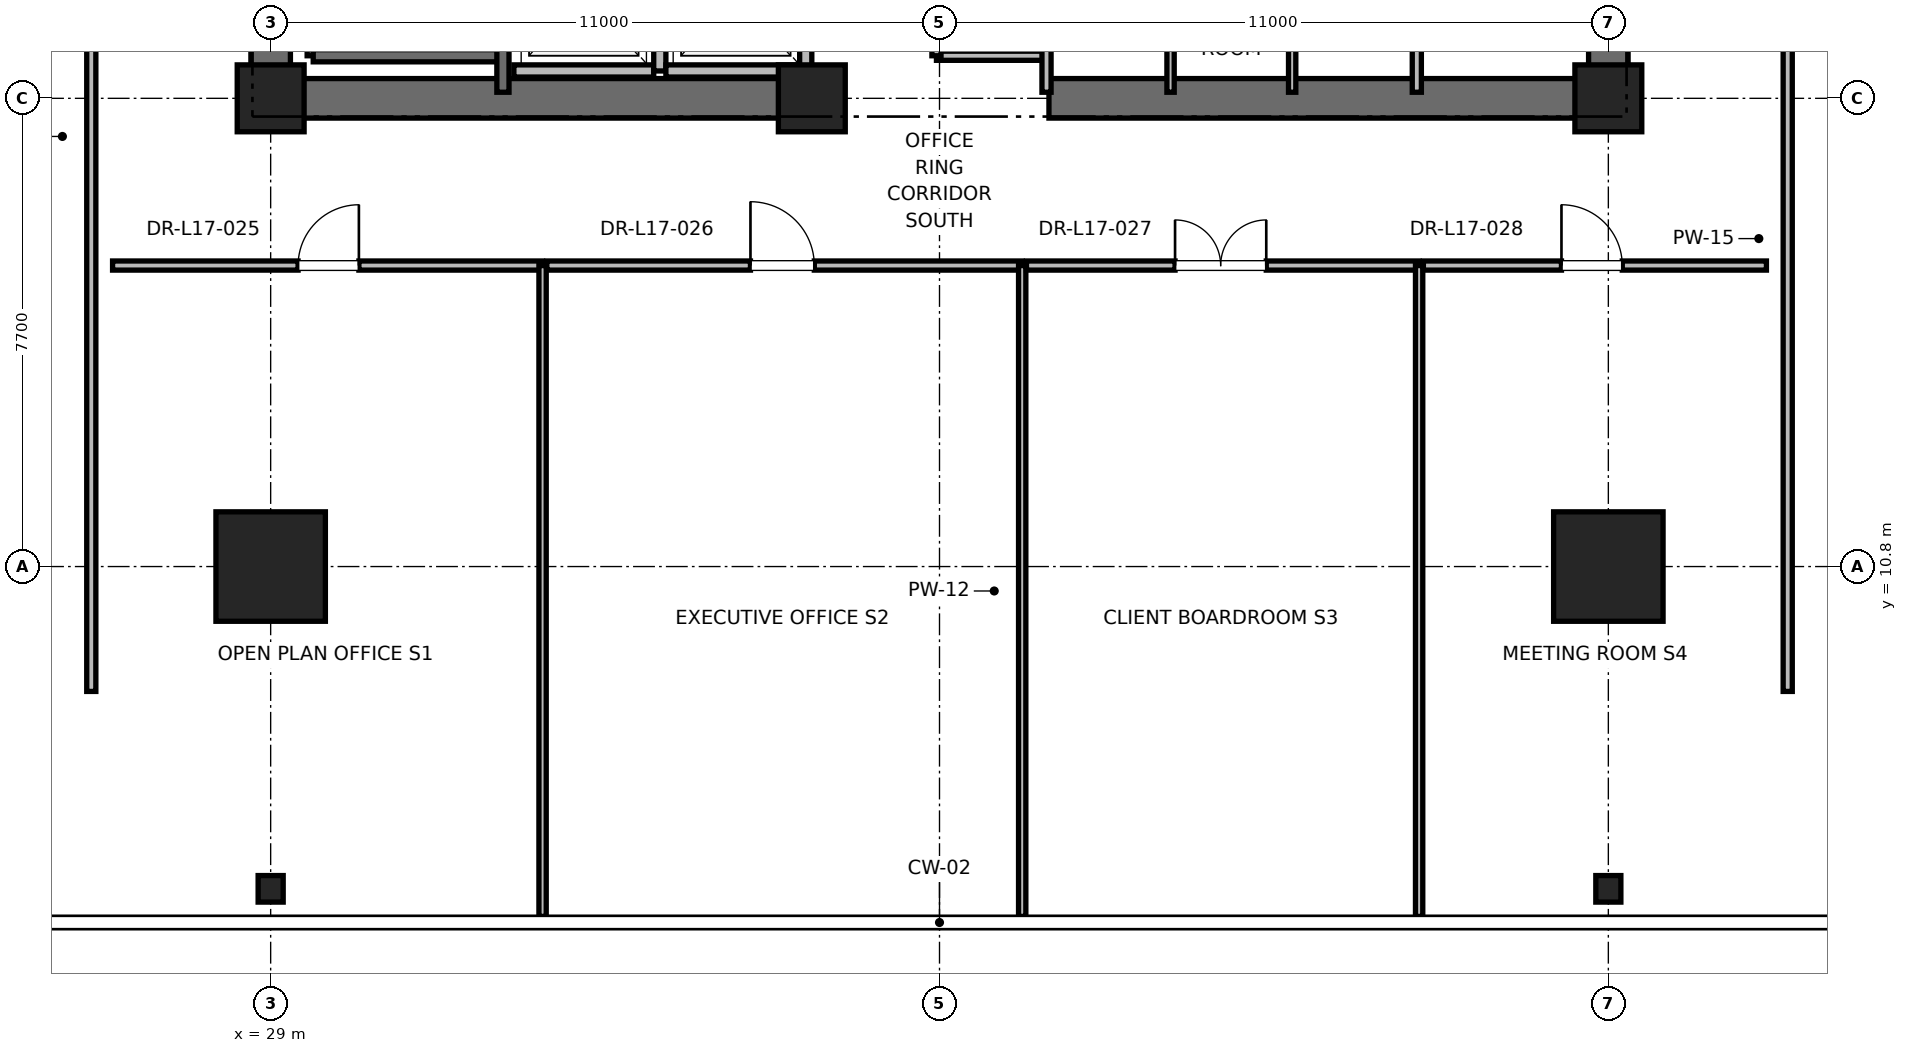
"""IFC4 building model, lengths in metres.
Left out: names, types, materials, properties, quantities, classifications, styles, units other than length and angle.
Written with IfcOpenShell. Run it as: python <this file> out.ifc"""

import sys

from ifc_helpers import new_model, si_unit, direction, frame, frame_2d, origin, origin_2d, place, context, subcontext, project, spatial, rectangle, i_section, extrude, element, fill, save


model = new_model("IFC4")
c1 = context("Model", 3, precision=1e-05, world=origin(), true_north=direction((0.0, 1.0)))
c2 = subcontext(c1, "Body", "Model", "MODEL_VIEW")
j1 = project(units=[si_unit("LENGTHUNIT", "METRE"), si_unit("PLANEANGLEUNIT", "RADIAN")], contexts=[c1])
p1 = place(None, origin())
s1 = spatial("IfcSite", under=j1, at=p1, CompositionType="ELEMENT")
p2 = place(p1, origin())
s2 = spatial("IfcBuilding", under=s1, at=p2, CompositionType="ELEMENT")
p3 = place(p2, frame((0.0, 0.0, 75.6)))
s3 = spatial("IfcBuildingStorey", under=s2, at=p3, CompositionType="ELEMENT", Elevation=75.6)
for number, where, z_axis, x_axis in (
    (1, (29.0, 10.8, 0.0), (0.0, 0.0, 1.0), (1.0, 0.0, 0.0)),
    (2, (51.0, 10.8, 0.0), (0.0, 0.0, 1.0), (1.0, 0.0, 0.0)),
):
    element("IfcColumn", number, at=place(p3, frame(where, z_axis=z_axis, x_axis=x_axis)), inside=s3, PredefinedType="COLUMN", context=c2, shape_type="SweptSolid", body=[
        extrude(rectangle(XDim=1.8, YDim=1.8, at=origin_2d()), origin(), (0.0, 0.0, 1.0), 4.0),
    ])
for number, where, z_axis, x_axis in (
    (3, (29.0, 5.5, 0.0), (0.0, 0.0, 1.0), (1.0, 0.0, 0.0)),
    (4, (51.0, 5.5, 0.0), (0.0, 0.0, 1.0), (1.0, 0.0, 0.0)),
):
    element("IfcColumn", number, at=place(p3, frame(where, z_axis=z_axis, x_axis=x_axis)), inside=s3, PredefinedType="COLUMN", context=c2, shape_type="SweptSolid", body=[
        extrude(i_section(OverallWidth=0.412, OverallDepth=0.437, WebThickness=0.036, FlangeThickness=0.058, FilletRadius=0.015, at=origin_2d()), origin(), (0.0, 0.0, 1.0), 4.0),
    ])
for number, where, z_axis, x_axis in (
    (5, (29.0, 18.5, 0.0), (0.0, 0.0, 1.0), (1.0, 0.0, 0.0)),
    (6, (51.0, 18.5, 0.0), (0.0, 0.0, 1.0), (1.0, 0.0, 0.0)),
    (7, (37.9, 18.5, 0.0), (0.0, 0.0, 1.0), (1.0, 0.0, 0.0)),
):
    element("IfcColumn", number, at=place(p3, frame(where, z_axis=z_axis, x_axis=x_axis)), inside=s3, PredefinedType="PILASTER", context=c2, shape_type="SweptSolid", body=[
        extrude(rectangle(XDim=1.1, YDim=1.1, at=origin_2d()), origin(), (0.0, 0.0, 1.0), 4.0),
    ])
for number, where, z_axis, x_axis in (
    (8, (29.0, 18.5, 0.0), (0.0, 0.0, 1.0), (1.0, 0.0, 0.0)),
    (9, (41.8, 18.5, 0.0), (0.0, 0.0, 1.0), (1.0, 0.0, 0.0)),
):
    element("IfcWall", number, at=place(p3, frame(where, z_axis=z_axis, x_axis=x_axis)), inside=s3, PredefinedType="SHEAR", context=c2, shape_type="SweptSolid", body=[
        extrude(rectangle(XDim=9.2, YDim=0.65, at=frame_2d((4.6, 0.0))), origin(), (0.0, 0.0, 1.0), 3.76),
    ])
p4 = place(p3, frame((29.0, 18.5, 0.0), z_axis=(0.0, 0.0, 1.0), x_axis=(0.0, 1.0, 0.0)))
e10 = element("IfcWall", 10, at=p4, inside=s3, PredefinedType="SHEAR", context=c2, shape_type="SweptSolid", body=[
    extrude(rectangle(XDim=8.8, YDim=0.65, at=frame_2d((4.4, 0.0))), origin(), (0.0, 0.0, 1.0), 3.76),
])
p5 = place(p3, frame((51.0, 18.5, 0.0), z_axis=(0.0, 0.0, 1.0), x_axis=(0.0, 1.0, 0.0)))
e11 = element("IfcWall", 11, at=p5, inside=s3, PredefinedType="SHEAR", context=c2, shape_type="SweptSolid", body=[
    extrude(rectangle(XDim=5.8, YDim=0.65, at=frame_2d((2.9, 0.0))), origin(), (0.0, 0.0, 1.0), 3.76),
])
p6 = place(p3, frame((29.7, 19.2, 0.0), z_axis=(0.0, 0.0, 1.0), x_axis=(0.0, 1.0, 0.0)))
e12 = element("IfcWall", 12, at=p6, inside=s3, PredefinedType="SOLIDWALL", context=c2, shape_type="SweptSolid", body=[
    extrude(rectangle(XDim=8.15, YDim=0.2, at=frame_2d((4.075, 0.0))), origin(), (0.0, 0.0, 1.0), 3.76),
])
p7 = place(p3, frame((29.7, 19.2, 0.0), z_axis=(0.0, 0.0, 1.0), x_axis=(1.0, 0.0, 0.0)))
e13 = element("IfcWall", 13, at=p7, inside=s3, PredefinedType="SOLIDWALL", context=c2, shape_type="SweptSolid", body=[
    extrude(rectangle(XDim=3.12, YDim=0.2, at=frame_2d((1.56, 0.0))), origin(), (0.0, 0.0, 1.0), 3.76),
])
p8 = place(p3, frame((32.82, 18.6, 0.0), z_axis=(0.0, 0.0, 1.0), x_axis=(0.0, 1.0, 0.0)))
e14 = element("IfcWall", 14, at=p8, inside=s3, PredefinedType="SOLIDWALL", context=c2, shape_type="SweptSolid", body=[
    extrude(rectangle(XDim=8.78, YDim=0.2, at=frame_2d((4.39, 0.0))), origin(), (0.0, 0.0, 1.0), 3.76),
])
p9 = place(p3, frame((33.0, 18.95, 0.0), z_axis=(0.0, 0.0, 1.0), x_axis=(1.0, 0.0, 0.0)))
e15 = element("IfcWall", 15, at=p9, inside=s3, PredefinedType="SOLIDWALL", context=c2, shape_type="SweptSolid", body=[
    extrude(rectangle(XDim=2.3, YDim=0.2, at=frame_2d((1.15, 0.0))), origin(), (0.0, 0.0, 1.0), 3.76),
])
p10 = place(p3, frame((35.4, 18.95, 0.0), z_axis=(0.0, 0.0, 1.0), x_axis=(0.0, 1.0, 0.0)))
e16 = element("IfcWall", 16, at=p10, inside=s3, PredefinedType="SOLIDWALL", context=c2, shape_type="SweptSolid", body=[
    extrude(rectangle(XDim=2.6, YDim=0.2, at=frame_2d((1.3, 0.0))), origin(), (0.0, 0.0, 1.0), 3.76),
])
p11 = place(p3, frame((35.5, 18.95, 0.0), z_axis=(0.0, 0.0, 1.0), x_axis=(1.0, 0.0, 0.0)))
e17 = element("IfcWall", 17, at=p11, inside=s3, PredefinedType="SOLIDWALL", context=c2, shape_type="SweptSolid", body=[
    extrude(rectangle(XDim=2.3, YDim=0.2, at=frame_2d((1.15, 0.0))), origin(), (0.0, 0.0, 1.0), 2.54),
])
p12 = place(p3, frame((37.8, 18.95, 0.0), z_axis=(0.0, 0.0, 1.0), x_axis=(0.0, 1.0, 0.0)))
e18 = element("IfcWall", 18, at=p12, inside=s3, PredefinedType="SOLIDWALL", context=c2, shape_type="SweptSolid", body=[
    extrude(rectangle(XDim=2.6, YDim=0.2, at=frame_2d((1.3, 0.0))), origin(), (0.0, 0.0, 1.0), 2.54),
])
p13 = place(p3, frame((39.95, 19.2, 0.0), z_axis=(0.0, 0.0, 1.0), x_axis=(1.0, 0.0, 0.0)))
e19 = element("IfcWall", 19, at=p13, inside=s3, PredefinedType="PARTITIONING", context=c2, shape_type="SweptSolid", body=[
    extrude(rectangle(XDim=1.81, YDim=0.15, at=frame_2d((0.905, 0.0))), origin(), (0.0, 0.0, 1.0), 2.85),
])
p14 = place(p3, frame((41.76, 18.6, 0.0), z_axis=(0.0, 0.0, 1.0), x_axis=(0.0, 1.0, 0.0)))
e20 = element("IfcWall", 20, at=p14, inside=s3, PredefinedType="PARTITIONING", context=c2, shape_type="SweptSolid", body=[
    extrude(rectangle(XDim=3.6, YDim=0.15, at=frame_2d((1.8, 0.0))), origin(), (0.0, 0.0, 1.0), 2.54),
])
p15 = place(p3, frame((39.95, 19.2, 0.0), z_axis=(0.0, 0.0, 1.0), x_axis=(0.0, 1.0, 0.0)))
e21 = element("IfcWall", 21, at=p15, inside=s3, PredefinedType="PARTITIONING", context=c2, shape_type="SweptSolid", body=[
    extrude(rectangle(XDim=3.0, YDim=0.15, at=frame_2d((1.5, 0.0))), origin(), (0.0, 0.0, 1.0), 2.85),
])
p16 = place(p15, frame((1.05, 0.0, 0.0)))
e22 = element("IfcOpeningElement", 22, at=p16, cuts=e21, PredefinedType="OPENING", context=c2, shape_type="SweptSolid", body=[
    extrude(rectangle(XDim=0.9, YDim=2.1, at=frame_2d((0.45, 1.05))), frame((0.0, 0.075, 0.0), z_axis=(0.0, -1.0, 0.0), x_axis=(1.0, 0.0, 0.0)), (0.0, 0.0, 1.0), 0.15),
])
p17 = place(p3, frame((47.85, 18.6, 0.0), z_axis=(0.0, 0.0, 1.0), x_axis=(0.0, 1.0, 0.0)))
e23 = element("IfcWall", 23, at=p17, inside=s3, PredefinedType="PARTITIONING", context=c2, shape_type="SweptSolid", body=[
    extrude(rectangle(XDim=2.54, YDim=0.15, at=frame_2d((1.27, 0.0))), origin(), (0.0, 0.0, 1.0), 2.85),
])
for number, where, z_axis, x_axis in (
    (24, (43.8, 18.6, 0.0), (0.0, 0.0, 1.0), (0.0, 1.0, 0.0)),
    (25, (45.8, 18.6, 0.0), (0.0, 0.0, 1.0), (0.0, 1.0, 0.0)),
):
    element("IfcWall", number, at=place(p3, frame(where, z_axis=z_axis, x_axis=x_axis)), inside=s3, PredefinedType="PARTITIONING", context=c2, shape_type="SweptSolid", body=[
        extrude(rectangle(XDim=3.02, YDim=0.12, at=frame_2d((1.51, 0.0))), origin(), (0.0, 0.0, 1.0), 2.85),
    ])
p18 = place(p3, frame((26.4, 15.75, 0.0), z_axis=(0.0, 0.0, 1.0), x_axis=(1.0, 0.0, 0.0)))
e26 = element("IfcWall", 26, at=p18, inside=s3, PredefinedType="PARTITIONING", context=c2, shape_type="SweptSolid", body=[
    extrude(rectangle(XDim=7.072, YDim=0.15, at=frame_2d((3.536, 0.0))), origin(), (0.0, 0.0, 1.0), 2.85),
])
p19 = place(p18, frame((3.051, 0.0, 0.0)))
e27 = element("IfcOpeningElement", 27, at=p19, cuts=e26, PredefinedType="OPENING", context=c2, shape_type="SweptSolid", body=[
    extrude(rectangle(XDim=1.0, YDim=2.15, at=frame_2d((0.5, 1.075))), frame((0.0, 0.075, 0.0), z_axis=(0.0, -1.0, 0.0), x_axis=(1.0, 0.0, 0.0)), (0.0, 0.0, 1.0), 0.15),
])
p20 = place(p3, frame((33.472, 5.046, 0.0), z_axis=(0.0, 0.0, 1.0), x_axis=(0.0, 1.0, 0.0)))
e28 = element("IfcWall", 28, at=p20, inside=s3, PredefinedType="PARTITIONING", context=c2, shape_type="SweptSolid", body=[
    extrude(rectangle(XDim=10.704, YDim=0.12, at=frame_2d((5.352, 0.0))), origin(), (0.0, 0.0, 1.0), 2.39),
])
p21 = place(p3, frame((33.542, 15.75, 0.0), z_axis=(0.0, 0.0, 1.0), x_axis=(1.0, 0.0, 0.0)))
e29 = element("IfcWall", 29, at=p21, inside=s3, PredefinedType="PARTITIONING", context=c2, shape_type="SweptSolid", body=[
    extrude(rectangle(XDim=7.818, YDim=0.15, at=frame_2d((3.909, 0.0))), origin(), (0.0, 0.0, 1.0), 2.85),
])
p22 = place(p21, frame((3.349, 0.0, 0.0)))
e30 = element("IfcOpeningElement", 30, at=p22, cuts=e29, PredefinedType="OPENING", context=c2, shape_type="SweptSolid", body=[
    extrude(rectangle(XDim=1.05, YDim=2.2, at=frame_2d((0.525, 1.1))), frame((0.0, 0.075, 0.0), z_axis=(0.0, -1.0, 0.0), x_axis=(1.0, 0.0, 0.0)), (0.0, 0.0, 1.0), 0.15),
])
p23 = place(p3, frame((41.36, 5.046, 0.0), z_axis=(0.0, 0.0, 1.0), x_axis=(0.0, 1.0, 0.0)))
e31 = element("IfcWall", 31, at=p23, inside=s3, PredefinedType="PARTITIONING", context=c2, shape_type="SweptSolid", body=[
    extrude(rectangle(XDim=10.704, YDim=0.12, at=frame_2d((5.352, 0.0))), origin(), (0.0, 0.0, 1.0), 2.39),
])
p24 = place(p3, frame((41.43, 15.75, 0.0), z_axis=(0.0, 0.0, 1.0), x_axis=(1.0, 0.0, 0.0)))
e32 = element("IfcWall", 32, at=p24, inside=s3, PredefinedType="PARTITIONING", context=c2, shape_type="SweptSolid", body=[
    extrude(rectangle(XDim=6.458, YDim=0.15, at=frame_2d((3.229, 0.0))), origin(), (0.0, 0.0, 1.0), 2.85),
])
p25 = place(p24, frame((2.444, 0.0, 0.0)))
e33 = element("IfcOpeningElement", 33, at=p25, cuts=e32, PredefinedType="OPENING", context=c2, shape_type="SweptSolid", body=[
    extrude(rectangle(XDim=1.5, YDim=2.25, at=frame_2d((0.75, 1.125))), frame((0.0, 0.075, 0.0), z_axis=(0.0, -1.0, 0.0), x_axis=(1.0, 0.0, 0.0)), (0.0, 0.0, 1.0), 0.15),
])
p26 = place(p3, frame((47.888, 5.046, 0.0), z_axis=(0.0, 0.0, 1.0), x_axis=(0.0, 1.0, 0.0)))
e34 = element("IfcWall", 34, at=p26, inside=s3, PredefinedType="PARTITIONING", context=c2, shape_type="SweptSolid", body=[
    extrude(rectangle(XDim=10.704, YDim=0.12, at=frame_2d((5.352, 0.0))), origin(), (0.0, 0.0, 1.0), 2.39),
])
p27 = place(p3, frame((47.958, 15.75, 0.0), z_axis=(0.0, 0.0, 1.0), x_axis=(1.0, 0.0, 0.0)))
e35 = element("IfcWall", 35, at=p27, inside=s3, PredefinedType="PARTITIONING", context=c2, shape_type="SweptSolid", body=[
    extrude(rectangle(XDim=5.642, YDim=0.15, at=frame_2d((2.821, 0.0))), origin(), (0.0, 0.0, 1.0), 2.85),
])
p28 = place(p27, frame((2.271, 0.0, 0.0)))
e36 = element("IfcOpeningElement", 36, at=p28, cuts=e35, PredefinedType="OPENING", context=c2, shape_type="SweptSolid", body=[
    extrude(rectangle(XDim=1.0, YDim=2.15, at=frame_2d((0.5, 1.075))), frame((0.0, 0.075, 0.0), z_axis=(0.0, -1.0, 0.0), x_axis=(1.0, 0.0, 0.0)), (0.0, 0.0, 1.0), 0.15),
])
p29 = place(p3, frame((26.05, 8.746, 0.0), z_axis=(0.0, 0.0, 1.0), x_axis=(0.0, 1.0, 0.0)))
e37 = element("IfcWall", 37, at=p29, inside=s3, PredefinedType="PARTITIONING", context=c2, shape_type="SweptSolid", body=[
    extrude(rectangle(XDim=37.507, YDim=0.15, at=frame_2d((18.754, 0.0))), origin(), (0.0, 0.0, 1.0), 2.85),
])
p30 = place(p29, frame((18.254, 0.0, 0.0)))
e38 = element("IfcOpeningElement", 38, at=p30, cuts=e37, PredefinedType="OPENING", context=c2, shape_type="SweptSolid", body=[
    extrude(rectangle(XDim=1.0, YDim=2.15, at=frame_2d((0.5, 1.075))), frame((0.0, 0.075, 0.0), z_axis=(0.0, -1.0, 0.0), x_axis=(1.0, 0.0, 0.0)), (0.0, 0.0, 1.0), 0.15),
])
p31 = place(p3, frame((53.95, 8.746, 0.0), z_axis=(0.0, 0.0, 1.0), x_axis=(0.0, 1.0, 0.0)))
e39 = element("IfcWall", 39, at=p31, inside=s3, PredefinedType="PARTITIONING", context=c2, shape_type="SweptSolid", body=[
    extrude(rectangle(XDim=21.004, YDim=0.15, at=frame_2d((10.502, 0.0))), origin(), (0.0, 0.0, 1.0), 2.85),
])
p32 = place(p31, frame((14.894, 0.0, 0.0)))
e40 = element("IfcOpeningElement", 40, at=p32, cuts=e39, PredefinedType="OPENING", context=c2, shape_type="SweptSolid", body=[
    extrude(rectangle(XDim=1.0, YDim=2.15, at=frame_2d((0.5, 1.075))), frame((0.0, 0.075, 0.0), z_axis=(0.0, -1.0, 0.0), x_axis=(1.0, 0.0, 0.0)), (0.0, 0.0, 1.0), 0.15),
])
p33 = place(p19, origin())
e41 = element("IfcDoor", 41, at=p33, inside=s3, OperationType="SINGLE_SWING_RIGHT", PredefinedType="DOOR", context=c2, shape_type="SweptSolid", body=[
    extrude(rectangle(XDim=1.0, YDim=2.15, at=frame_2d((0.5, 1.075))), frame((0.0, 0.025, 0.0), z_axis=(0.0, -1.0, 0.0), x_axis=(1.0, 0.0, 0.0)), (0.0, 0.0, 1.0), 0.05),
])
fill(e27, e41)
p34 = place(p22, origin())
e42 = element("IfcDoor", 42, at=p34, inside=s3, OperationType="SINGLE_SWING_LEFT", PredefinedType="DOOR", context=c2, shape_type="SweptSolid", body=[
    extrude(rectangle(XDim=1.05, YDim=2.2, at=frame_2d((0.525, 1.1))), frame((0.0, 0.025, 0.0), z_axis=(0.0, -1.0, 0.0), x_axis=(1.0, 0.0, 0.0)), (0.0, 0.0, 1.0), 0.05),
])
fill(e30, e42)
p35 = place(p25, origin())
e43 = element("IfcDoor", 43, at=p35, inside=s3, OperationType="DOUBLE_DOOR_SINGLE_SWING", PredefinedType="DOOR", context=c2, shape_type="SweptSolid", body=[
    extrude(rectangle(XDim=1.5, YDim=2.25, at=frame_2d((0.75, 1.125))), frame((0.0, 0.025, 0.0), z_axis=(0.0, -1.0, 0.0), x_axis=(1.0, 0.0, 0.0)), (0.0, 0.0, 1.0), 0.05),
])
fill(e33, e43)
p36 = place(p28, origin())
e44 = element("IfcDoor", 44, at=p36, inside=s3, OperationType="SINGLE_SWING_LEFT", PredefinedType="DOOR", context=c2, shape_type="SweptSolid", body=[
    extrude(rectangle(XDim=1.0, YDim=2.15, at=frame_2d((0.5, 1.075))), frame((0.0, 0.025, 0.0), z_axis=(0.0, -1.0, 0.0), x_axis=(1.0, 0.0, 0.0)), (0.0, 0.0, 1.0), 0.05),
])
fill(e36, e44)
save(model, sys.argv[1])
